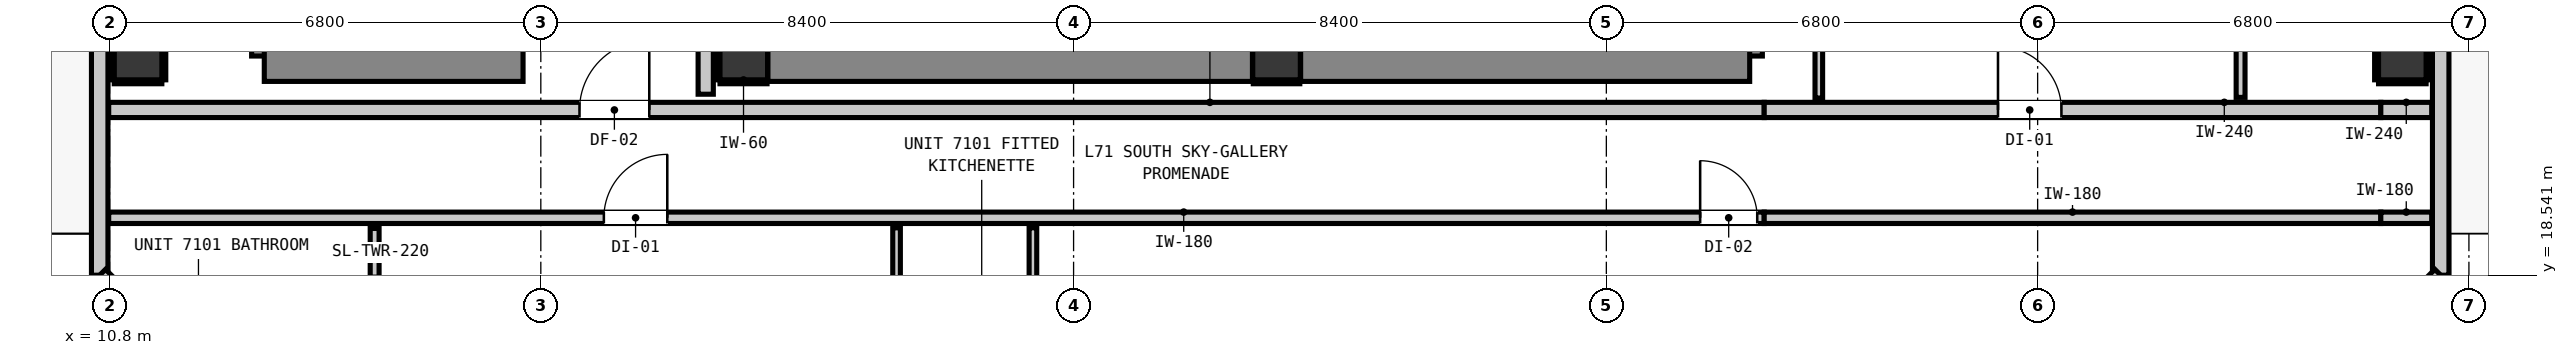
"""IFC4 building model, lengths in metres.
Left out: names, types, materials, properties, quantities, classifications, styles, units other than length and angle.
Written with IfcOpenShell. Run it as: python <this file> out.ifc"""

import sys

from ifc_helpers import new_model, si_unit, direction, frame, frame_2d, origin, origin_2d, place, context, subcontext, project, spatial, rectangle, extrude, element, fill, save


model = new_model("IFC4")
c1 = context("Model", 3, precision=1e-05, world=origin(), true_north=direction((0.0, 1.0)))
c2 = subcontext(c1, "Body", "Model", "MODEL_VIEW")
j1 = project(units=[si_unit("LENGTHUNIT", "METRE"), si_unit("PLANEANGLEUNIT", "RADIAN")], contexts=[c1])
p1 = place(None, origin())
s1 = spatial("IfcSite", under=j1, at=p1, CompositionType="ELEMENT")
p2 = place(p1, origin())
s2 = spatial("IfcBuilding", under=s1, at=p2, CompositionType="ELEMENT")
p3 = place(p2, frame((0.0, 0.0, 244.56)))
s3 = spatial("IfcBuildingStorey", under=s2, at=p3, CompositionType="ELEMENT", Elevation=244.56)
for number, where, z_axis, x_axis in (
    (1, (20.8, 22.0, 0.0), (0.0, 0.0, 1.0), (1.0, 0.0, 0.0)),
    (2, (29.2, 22.0, 0.0), (0.0, 0.0, 1.0), (1.0, 0.0, 0.0)),
):
    element("IfcColumn", number, at=place(p3, frame(where, z_axis=z_axis, x_axis=x_axis)), inside=s3, PredefinedType="COLUMN", context=c2, shape_type="SweptSolid", body=[
        extrude(rectangle(XDim=0.75, YDim=0.75, at=origin_2d()), origin(), (0.0, 0.0, 1.0), 3.32),
    ])
p4 = place(p3, frame((13.44, 22.0, 0.0), z_axis=(0.0, 0.0, 1.0), x_axis=(0.0, 1.0, 0.0)))
e3 = element("IfcWall", 3, at=p4, inside=s3, PredefinedType="SHEAR", context=c2, shape_type="SweptSolid", body=[
    extrude(rectangle(XDim=8.32, YDim=0.8, at=frame_2d((4.16, 0.0))), origin(), (0.0, 0.0, 1.0), 3.32),
])
p5 = place(p3, frame((13.24, 22.0, 0.0), z_axis=(0.0, 0.0, 1.0), x_axis=(1.0, 0.0, 0.0)))
e4 = element("IfcWall", 4, at=p5, inside=s3, PredefinedType="SHEAR", context=c2, shape_type="SweptSolid", body=[
    extrude(rectangle(XDim=4.08, YDim=0.8, at=frame_2d((2.04, 0.0))), origin(), (0.0, 0.0, 1.0), 3.32),
])
p6 = place(p3, frame((36.46, 22.0, 0.0), z_axis=(0.0, 0.0, 1.0), x_axis=(0.0, 1.0, 0.0)))
e5 = element("IfcWall", 5, at=p6, inside=s3, PredefinedType="SHEAR", context=c2, shape_type="SweptSolid", body=[
    extrude(rectangle(XDim=8.32, YDim=0.8, at=frame_2d((4.16, 0.0))), origin(), (0.0, 0.0, 1.0), 3.32),
])
p7 = place(p3, frame((29.58, 22.0, 0.0), z_axis=(0.0, 0.0, 1.0), x_axis=(1.0, 0.0, 0.0)))
e6 = element("IfcWall", 6, at=p7, inside=s3, PredefinedType="SHEAR", context=c2, shape_type="SweptSolid", body=[
    extrude(rectangle(XDim=7.08, YDim=0.8, at=frame_2d((3.54, 0.0))), origin(), (0.0, 0.0, 1.0), 3.32),
])
p8 = place(p3, frame((21.18, 22.0, 0.0), z_axis=(0.0, 0.0, 1.0), x_axis=(1.0, 0.0, 0.0)))
e7 = element("IfcWall", 7, at=p8, inside=s3, PredefinedType="SHEAR", context=c2, shape_type="SweptSolid", body=[
    extrude(rectangle(XDim=7.64, YDim=0.8, at=frame_2d((3.82, 0.0))), origin(), (0.0, 0.0, 1.0), 3.32),
])
for number, where, z_axis, x_axis in (
    (8, (11.25, 22.0, 0.0), (0.0, 0.0, 1.0), (1.0, 0.0, 0.0)),
    (9, (46.95, 22.0, 0.0), (0.0, 0.0, 1.0), (1.0, 0.0, 0.0)),
):
    element("IfcColumn", number, at=place(p3, frame(where, z_axis=z_axis, x_axis=x_axis)), inside=s3, PredefinedType="COLUMN", context=c2, shape_type="SweptSolid", body=[
        extrude(rectangle(XDim=0.75, YDim=0.75, at=origin_2d()), origin(), (0.0, 0.0, 1.0), 3.32),
    ])
p9 = place(p3, frame((10.645, 18.545, 0.0), z_axis=(0.0, 0.0, 1.0), x_axis=(0.0, 1.0, 0.0)))
e10 = element("IfcWall", 10, at=p9, inside=s3, PredefinedType="STANDARD", context=c2, shape_type="SweptSolid", body=[
    extrude(rectangle(XDim=30.31, YDim=0.26, at=frame_2d((15.155, 0.0))), origin(), (0.0, 0.0, 1.0), 3.1),
])
p10 = place(p9, frame((24.171, 0.0, 0.0)))
e11 = element("IfcOpeningElement", 11, at=p10, cuts=e10, PredefinedType="OPENING", context=c2, shape_type="SweptSolid", body=[
    extrude(rectangle(XDim=1.0, YDim=2.15, at=frame_2d((0.5, 1.075))), frame((0.0, 0.14, 0.0), z_axis=(0.0, -1.0, 0.0), x_axis=(1.0, 0.0, 0.0)), (0.0, 0.0, 1.0), 0.28),
])
p11 = place(p9, frame((27.195, 0.0, 0.85)))
e12 = element("IfcOpeningElement", 12, at=p11, cuts=e10, PredefinedType="OPENING", context=c2, shape_type="SweptSolid", body=[
    extrude(rectangle(XDim=1.2, YDim=1.8, at=frame_2d((0.6, 0.9))), frame((0.0, 0.14, 0.0), z_axis=(0.0, -1.0, 0.0), x_axis=(1.0, 0.0, 0.0)), (0.0, 0.0, 1.0), 0.28),
])
p12 = place(p3, frame((47.555, 48.855, 0.0), z_axis=(0.0, 0.0, 1.0), x_axis=(0.0, -1.0, 0.0)))
e13 = element("IfcWall", 13, at=p12, inside=s3, PredefinedType="STANDARD", context=c2, shape_type="SweptSolid", body=[
    extrude(rectangle(XDim=30.31, YDim=0.26, at=frame_2d((15.155, 0.0))), origin(), (0.0, 0.0, 1.0), 3.1),
])
p13 = place(p12, frame((3.729, 0.0, 0.0)))
e14 = element("IfcOpeningElement", 14, at=p13, cuts=e13, PredefinedType="OPENING", context=c2, shape_type="SweptSolid", body=[
    extrude(rectangle(XDim=1.0, YDim=2.15, at=frame_2d((0.5, 1.075))), frame((0.0, 0.14, 0.0), z_axis=(0.0, -1.0, 0.0), x_axis=(1.0, 0.0, 0.0)), (0.0, 0.0, 1.0), 0.28),
])
for number, where, z_axis, x_axis in (
    (15, (47.555, 18.545, 0.0), (0.0, 0.0, 1.0), (-0.707, -0.707, 0.0)),
    (16, (12.745, 16.445, 0.0), (0.0, 0.0, 1.0), (-0.707, 0.707, 0.0)),
):
    element("IfcWall", number, at=place(p3, frame(where, z_axis=z_axis, x_axis=x_axis)), inside=s3, PredefinedType="STANDARD", context=c2, shape_type="SweptSolid", body=[
        extrude(rectangle(XDim=2.97, YDim=0.26, at=frame_2d((1.485, 0.0))), origin(), (0.0, 0.0, 1.0), 3.1),
    ])
p14 = place(p3, frame((10.787, 21.15, 0.0), z_axis=(0.0, 0.0, 1.0), x_axis=(1.0, 0.0, 0.0)))
e17 = element("IfcWall", 17, at=p14, inside=s3, PredefinedType="PARTITIONING", context=c2, shape_type="SweptSolid", body=[
    extrude(rectangle(XDim=26.102, YDim=0.24, at=frame_2d((13.051, 0.0))), origin(), (0.0, 0.0, 1.0), 3.1),
])
p15 = place(p14, frame((7.423, 0.0, 0.0)))
e18 = element("IfcOpeningElement", 18, at=p15, cuts=e17, PredefinedType="OPENING", context=c2, shape_type="SweptSolid", body=[
    extrude(rectangle(XDim=1.1, YDim=2.15, at=frame_2d((0.55, 1.075))), frame((0.0, 0.13, 0.0), z_axis=(0.0, -1.0, 0.0), x_axis=(1.0, 0.0, 0.0)), (0.0, 0.0, 1.0), 0.26),
])
p16 = place(p3, frame((36.889, 21.15, 0.0), z_axis=(0.0, 0.0, 1.0), x_axis=(1.0, 0.0, 0.0)))
e19 = element("IfcWall", 19, at=p16, inside=s3, PredefinedType="PARTITIONING", context=c2, shape_type="SweptSolid", body=[
    extrude(rectangle(XDim=9.722, YDim=0.24, at=frame_2d((4.861, 0.0))), origin(), (0.0, 0.0, 1.0), 2.477),
])
p17 = place(p16, frame((3.686, 0.0, 0.0)))
e20 = element("IfcOpeningElement", 20, at=p17, cuts=e19, PredefinedType="OPENING", context=c2, shape_type="SweptSolid", body=[
    extrude(rectangle(XDim=1.0, YDim=2.15, at=frame_2d((0.5, 1.075))), frame((0.0, 0.13, 0.0), z_axis=(0.0, -1.0, 0.0), x_axis=(1.0, 0.0, 0.0)), (0.0, 0.0, 1.0), 0.26),
])
p18 = place(p3, frame((46.611, 21.15, 0.0), z_axis=(0.0, 0.0, 1.0), x_axis=(1.0, 0.0, 0.0)))
e21 = element("IfcWall", 21, at=p18, inside=s3, PredefinedType="PARTITIONING", context=c2, shape_type="SweptSolid", body=[
    extrude(rectangle(XDim=0.802, YDim=0.24, at=frame_2d((0.401, 0.0))), origin(), (0.0, 0.0, 1.0), 3.1),
])
p19 = place(p3, frame((10.787, 19.45, 0.0), z_axis=(0.0, 0.0, 1.0), x_axis=(1.0, 0.0, 0.0)))
e22 = element("IfcWall", 22, at=p19, inside=s3, PredefinedType="PARTITIONING", context=c2, shape_type="SweptSolid", body=[
    extrude(rectangle(XDim=26.102, YDim=0.18, at=frame_2d((13.051, 0.0))), origin(), (0.0, 0.0, 1.0), 3.1),
])
p20 = place(p19, frame((7.807, 0.0, 0.0)))
e23 = element("IfcOpeningElement", 23, at=p20, cuts=e22, PredefinedType="OPENING", context=c2, shape_type="SweptSolid", body=[
    extrude(rectangle(XDim=1.0, YDim=2.15, at=frame_2d((0.5, 1.075))), frame((0.0, 0.1, 0.0), z_axis=(0.0, -1.0, 0.0), x_axis=(1.0, 0.0, 0.0)), (0.0, 0.0, 1.0), 0.2),
])
p21 = place(p19, frame((25.092, 0.0, 0.0)))
e24 = element("IfcOpeningElement", 24, at=p21, cuts=e22, PredefinedType="OPENING", context=c2, shape_type="SweptSolid", body=[
    extrude(rectangle(XDim=0.9, YDim=2.1, at=frame_2d((0.45, 1.05))), frame((0.0, 0.1, 0.0), z_axis=(0.0, -1.0, 0.0), x_axis=(1.0, 0.0, 0.0)), (0.0, 0.0, 1.0), 0.2),
])
p22 = place(p3, frame((36.889, 19.45, 0.0), z_axis=(0.0, 0.0, 1.0), x_axis=(1.0, 0.0, 0.0)))
e25 = element("IfcWall", 25, at=p22, inside=s3, PredefinedType="PARTITIONING", context=c2, shape_type="SweptSolid", body=[
    extrude(rectangle(XDim=9.722, YDim=0.18, at=frame_2d((4.861, 0.0))), origin(), (0.0, 0.0, 1.0), 2.477),
])
p23 = place(p3, frame((46.611, 19.45, 0.0), z_axis=(0.0, 0.0, 1.0), x_axis=(1.0, 0.0, 0.0)))
e26 = element("IfcWall", 26, at=p23, inside=s3, PredefinedType="PARTITIONING", context=c2, shape_type="SweptSolid", body=[
    extrude(rectangle(XDim=0.802, YDim=0.18, at=frame_2d((0.401, 0.0))), origin(), (0.0, 0.0, 1.0), 3.1),
])
p24 = place(p3, frame((20.2, 21.398, 0.0), z_axis=(0.0, 0.0, 1.0), x_axis=(0.0, 1.0, 0.0)))
e27 = element("IfcWall", 27, at=p24, inside=s3, PredefinedType="PARTITIONING", context=c2, shape_type="SweptSolid", body=[
    extrude(rectangle(XDim=6.754, YDim=0.24, at=frame_2d((3.377, 0.0))), origin(), (0.0, 0.0, 1.0), 3.1),
])
p25 = place(p3, frame((14.98, 16.587, 0.0), z_axis=(0.0, 0.0, 1.0), x_axis=(0.0, 1.0, 0.0)))
e28 = element("IfcWall", 28, at=p25, inside=s3, PredefinedType="PARTITIONING", context=c2, shape_type="SweptSolid", body=[
    extrude(rectangle(XDim=2.695, YDim=0.14, at=frame_2d((1.348, 0.0))), origin(), (0.0, 0.0, 1.0), 3.1),
])
p26 = place(p25, frame((1.088, 0.0, 0.0)))
e29 = element("IfcOpeningElement", 29, at=p26, cuts=e28, PredefinedType="OPENING", context=c2, shape_type="SweptSolid", body=[
    extrude(rectangle(XDim=0.86, YDim=2.02, at=frame_2d((0.43, 1.01))), frame((0.0, 0.08, 0.0), z_axis=(0.0, -1.0, 0.0), x_axis=(1.0, 0.0, 0.0)), (0.0, 0.0, 1.0), 0.16),
])
p27 = place(p3, frame((44.4, 21.348, 0.0), z_axis=(0.0, 0.0, 1.0), x_axis=(0.0, 1.0, 0.0)))
e30 = element("IfcWall", 30, at=p27, inside=s3, PredefinedType="PARTITIONING", context=c2, shape_type="SweptSolid", body=[
    extrude(rectangle(XDim=5.304, YDim=0.14, at=frame_2d((2.652, 0.0))), origin(), (0.0, 0.0, 1.0), 3.1),
])
p28 = place(p27, frame((2.19, 0.0, 0.0)))
e31 = element("IfcOpeningElement", 31, at=p28, cuts=e30, PredefinedType="OPENING", context=c2, shape_type="SweptSolid", body=[
    extrude(rectangle(XDim=0.9, YDim=2.1, at=frame_2d((0.45, 1.05))), frame((0.0, 0.08, 0.0), z_axis=(0.0, -1.0, 0.0), x_axis=(1.0, 0.0, 0.0)), (0.0, 0.0, 1.0), 0.16),
])
p29 = place(p3, frame((23.209, 16.587, 0.0), z_axis=(0.0, 0.0, 1.0), x_axis=(0.0, 1.0, 0.0)))
e32 = element("IfcWall", 32, at=p29, inside=s3, PredefinedType="PARTITIONING", context=c2, shape_type="SweptSolid", body=[
    extrude(rectangle(XDim=2.705, YDim=0.12, at=frame_2d((1.353, 0.0))), origin(), (0.0, 0.0, 1.0), 3.1),
])
p30 = place(p29, frame((0.988, 0.0, 0.0)))
e33 = element("IfcOpeningElement", 33, at=p30, cuts=e32, PredefinedType="OPENING", context=c2, shape_type="SweptSolid", body=[
    extrude(rectangle(XDim=0.9, YDim=2.1, at=frame_2d((0.45, 1.05))), frame((0.0, 0.07, 0.0), z_axis=(0.0, -1.0, 0.0), x_axis=(1.0, 0.0, 0.0)), (0.0, 0.0, 1.0), 0.14),
])
p31 = place(p3, frame((25.359, 16.587, 0.0), z_axis=(0.0, 0.0, 1.0), x_axis=(0.0, 1.0, 0.0)))
e34 = element("IfcWall", 34, at=p31, inside=s3, PredefinedType="PARTITIONING", context=c2, shape_type="SweptSolid", body=[
    extrude(rectangle(XDim=2.705, YDim=0.12, at=frame_2d((1.353, 0.0))), origin(), (0.0, 0.0, 1.0), 3.1),
])
p32 = place(p3, frame((37.75, 21.338, 0.0), z_axis=(0.0, 0.0, 1.0), x_axis=(0.0, 1.0, 0.0)))
e35 = element("IfcWall", 35, at=p32, inside=s3, PredefinedType="PARTITIONING", context=c2, shape_type="SweptSolid", body=[
    extrude(rectangle(XDim=10.524, YDim=0.12, at=frame_2d((5.262, 0.0))), origin(), (0.0, 0.0, 1.0), 3.1),
])
p33 = place(p3, frame((20.425, 21.593, 0.0), z_axis=(0.0, 0.0, 1.0), x_axis=(1.0, 0.0, 0.0)))
e36 = element("IfcWall", 36, at=p33, inside=s3, PredefinedType="PARTITIONING", context=c2, shape_type="SweptSolid", body=[
    extrude(rectangle(XDim=0.742, YDim=0.06, at=frame_2d((0.371, 0.0))), origin(), (0.0, 0.0, 1.0), 1.45),
])
p34 = place(p3, frame((20.393, 21.625, 0.0), z_axis=(0.0, 0.0, 1.0), x_axis=(0.0, 1.0, 0.0)))
e37 = element("IfcWall", 37, at=p34, inside=s3, PredefinedType="PARTITIONING", context=c2, shape_type="SweptSolid", body=[
    extrude(rectangle(XDim=0.75, YDim=0.06, at=frame_2d((0.375, 0.0))), origin(), (0.0, 0.0, 1.0), 1.45),
])
p35 = place(p3, frame((28.833, 21.593, 0.0), z_axis=(0.0, 0.0, 1.0), x_axis=(1.0, 0.0, 0.0)))
e38 = element("IfcWall", 38, at=p35, inside=s3, PredefinedType="PARTITIONING", context=c2, shape_type="SweptSolid", body=[
    extrude(rectangle(XDim=0.734, YDim=0.06, at=frame_2d((0.367, 0.0))), origin(), (0.0, 0.0, 1.0), 1.45),
])
for number, where, z_axis, x_axis in (
    (39, (10.875, 21.593, 0.0), (0.0, 0.0, 1.0), (1.0, 0.0, 0.0)),
    (40, (10.843, 21.625, 0.0), (0.0, 0.0, 1.0), (0.0, 1.0, 0.0)),
    (41, (11.657, 21.625, 0.0), (0.0, 0.0, 1.0), (0.0, 1.0, 0.0)),
    (42, (46.575, 21.593, 0.0), (0.0, 0.0, 1.0), (1.0, 0.0, 0.0)),
    (43, (46.543, 21.625, 0.0), (0.0, 0.0, 1.0), (0.0, 1.0, 0.0)),
    (44, (47.357, 21.625, 0.0), (0.0, 0.0, 1.0), (0.0, 1.0, 0.0)),
):
    element("IfcWall", number, at=place(p3, frame(where, z_axis=z_axis, x_axis=x_axis)), inside=s3, PredefinedType="PARTITIONING", context=c2, shape_type="SweptSolid", body=[
        extrude(rectangle(XDim=0.75, YDim=0.06, at=frame_2d((0.375, 0.0))), origin(), (0.0, 0.0, 1.0), 1.45),
    ])
p36 = place(p15, origin())
e45 = element("IfcDoor", 45, at=p36, inside=s3, OperationType="SINGLE_SWING_RIGHT", PredefinedType="DOOR", context=c2, shape_type="SweptSolid", body=[
    extrude(rectangle(XDim=1.1, YDim=2.15, at=frame_2d((0.55, 1.075))), frame((0.0, 0.025, 0.0), z_axis=(0.0, -1.0, 0.0), x_axis=(1.0, 0.0, 0.0)), (0.0, 0.0, 1.0), 0.05),
])
fill(e18, e45)
p37 = place(p20, origin())
e46 = element("IfcDoor", 46, at=p37, inside=s3, OperationType="SINGLE_SWING_RIGHT", PredefinedType="DOOR", context=c2, shape_type="SweptSolid", body=[
    extrude(rectangle(XDim=1.0, YDim=2.15, at=frame_2d((0.5, 1.075))), frame((0.0, 0.025, 0.0), z_axis=(0.0, -1.0, 0.0), x_axis=(1.0, 0.0, 0.0)), (0.0, 0.0, 1.0), 0.05),
])
fill(e23, e46)
p38 = place(p21, origin())
e47 = element("IfcDoor", 47, at=p38, inside=s3, OperationType="SINGLE_SWING_LEFT", PredefinedType="DOOR", context=c2, shape_type="SweptSolid", body=[
    extrude(rectangle(XDim=0.9, YDim=2.1, at=frame_2d((0.45, 1.05))), frame((0.0, 0.025, 0.0), z_axis=(0.0, -1.0, 0.0), x_axis=(1.0, 0.0, 0.0)), (0.0, 0.0, 1.0), 0.05),
])
fill(e24, e47)
p39 = place(p17, origin())
e48 = element("IfcDoor", 48, at=p39, inside=s3, OperationType="SINGLE_SWING_LEFT", PredefinedType="DOOR", context=c2, shape_type="SweptSolid", body=[
    extrude(rectangle(XDim=1.0, YDim=2.15, at=frame_2d((0.5, 1.075))), frame((0.0, 0.025, 0.0), z_axis=(0.0, -1.0, 0.0), x_axis=(1.0, 0.0, 0.0)), (0.0, 0.0, 1.0), 0.05),
])
fill(e20, e48)
save(model, sys.argv[1])
